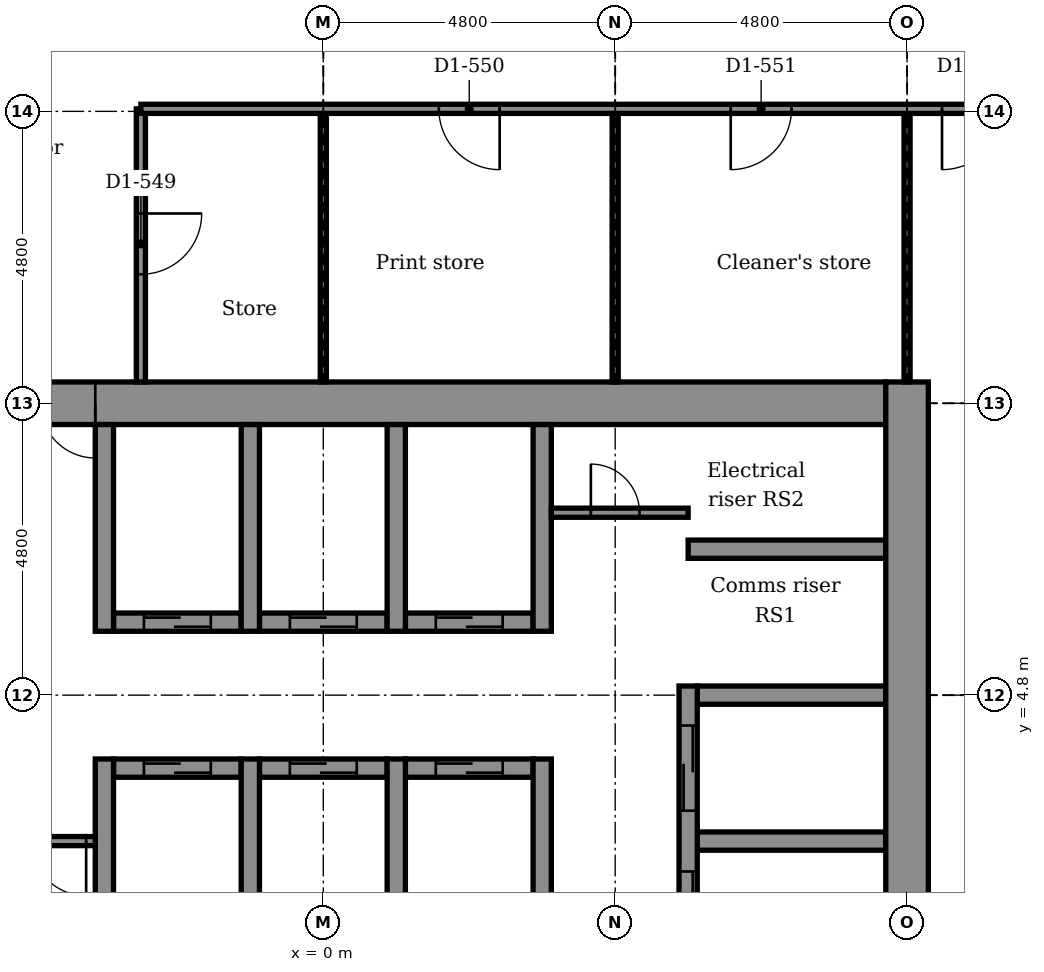
"""IFC4 building model, lengths in metres.
Left out: names, types, materials, properties, quantities, classifications, styles, units other than length and angle.
Written with IfcOpenShell. Run it as: python <this file> out.ifc"""

import sys

from ifc_helpers import new_model, si_unit, direction, frame, frame_2d, origin, place, context, subcontext, project, spatial, rectangle, extrude, element, fill, save


model = new_model("IFC4")
c1 = context("Model", 3, precision=1e-05, world=origin(), true_north=direction((0.0, 1.0)))
c2 = subcontext(c1, "Body", "Model", "MODEL_VIEW")
j1 = project(units=[si_unit("LENGTHUNIT", "METRE"), si_unit("PLANEANGLEUNIT", "RADIAN")], contexts=[c1])
p1 = place(None, origin())
s1 = spatial("IfcSite", under=j1, at=p1, CompositionType="ELEMENT")
p2 = place(p1, origin())
s2 = spatial("IfcBuilding", under=s1, at=p2, CompositionType="ELEMENT")
p3 = place(p2, frame((0.0, 0.0, 197.3)))
s3 = spatial("IfcBuildingStorey", under=s2, at=p3, CompositionType="ELEMENT", Elevation=197.3)
p4 = place(p3, frame((6.15, 2.4, -0.15), z_axis=(0.0, 0.0, 1.0), x_axis=(1.0, 0.0, 0.0)))
e1 = element("IfcWall", 1, at=p4, inside=s3, PredefinedType="STANDARD", context=c2, shape_type="SweptSolid", body=[
    extrude(rectangle(XDim=3.1, YDim=0.3, at=frame_2d((1.55, 0.0))), origin(), (0.0, 0.0, 1.0), 3.9),
])
p5 = place(p3, frame((-3.45, 3.6, -0.15), z_axis=(0.0, 0.0, 1.0), x_axis=(1.0, 0.0, 0.0)))
e2 = element("IfcWall", 2, at=p5, inside=s3, PredefinedType="STANDARD", context=c2, shape_type="SweptSolid", body=[
    extrude(rectangle(XDim=2.1, YDim=0.3, at=frame_2d((1.05, 0.0))), origin(), (0.0, 0.0, 1.0), 3.9),
])
p6 = place(p5, frame((0.5, 0.0, 0.15)))
e3 = element("IfcOpeningElement", 3, at=p6, cuts=e2, PredefinedType="OPENING", context=c2, shape_type="SweptSolid", body=[
    extrude(rectangle(XDim=1.1, YDim=2.1, at=frame_2d((0.55, 1.05))), frame((0.0, 0.16, 0.0), z_axis=(0.0, -1.0, 0.0), x_axis=(1.0, 0.0, 0.0)), (0.0, 0.0, 1.0), 0.32),
])
p7 = place(p3, frame((-1.05, 3.6, -0.15), z_axis=(0.0, 0.0, 1.0), x_axis=(1.0, 0.0, 0.0)))
e4 = element("IfcWall", 4, at=p7, inside=s3, PredefinedType="STANDARD", context=c2, shape_type="SweptSolid", body=[
    extrude(rectangle(XDim=2.1, YDim=0.3, at=frame_2d((1.05, 0.0))), origin(), (0.0, 0.0, 1.0), 3.9),
])
p8 = place(p7, frame((0.5, 0.0, 0.15)))
e5 = element("IfcOpeningElement", 5, at=p8, cuts=e4, PredefinedType="OPENING", context=c2, shape_type="SweptSolid", body=[
    extrude(rectangle(XDim=1.1, YDim=2.1, at=frame_2d((0.55, 1.05))), frame((0.0, 0.16, 0.0), z_axis=(0.0, -1.0, 0.0), x_axis=(1.0, 0.0, 0.0)), (0.0, 0.0, 1.0), 0.32),
])
p9 = place(p3, frame((1.35, 3.6, -0.15), z_axis=(0.0, 0.0, 1.0), x_axis=(1.0, 0.0, 0.0)))
e6 = element("IfcWall", 6, at=p9, inside=s3, PredefinedType="STANDARD", context=c2, shape_type="SweptSolid", body=[
    extrude(rectangle(XDim=2.1, YDim=0.3, at=frame_2d((1.05, 0.0))), origin(), (0.0, 0.0, 1.0), 3.9),
])
p10 = place(p9, frame((0.5, 0.0, 0.15)))
e7 = element("IfcOpeningElement", 7, at=p10, cuts=e6, PredefinedType="OPENING", context=c2, shape_type="SweptSolid", body=[
    extrude(rectangle(XDim=1.1, YDim=2.1, at=frame_2d((0.55, 1.05))), frame((0.0, 0.16, 0.0), z_axis=(0.0, -1.0, 0.0), x_axis=(1.0, 0.0, 0.0)), (0.0, 0.0, 1.0), 0.32),
])
p11 = place(p3, frame((6.15, 4.8, -0.15), z_axis=(0.0, 0.0, 1.0), x_axis=(1.0, 0.0, 0.0)))
e8 = element("IfcWall", 8, at=p11, inside=s3, PredefinedType="STANDARD", context=c2, shape_type="SweptSolid", body=[
    extrude(rectangle(XDim=3.1, YDim=0.3, at=frame_2d((1.55, 0.0))), origin(), (0.0, 0.0, 1.0), 3.9),
])
p12 = place(p3, frame((-3.45, 6.0, -0.15), z_axis=(0.0, 0.0, 1.0), x_axis=(1.0, 0.0, 0.0)))
e9 = element("IfcWall", 9, at=p12, inside=s3, PredefinedType="STANDARD", context=c2, shape_type="SweptSolid", body=[
    extrude(rectangle(XDim=2.1, YDim=0.3, at=frame_2d((1.05, 0.0))), origin(), (0.0, 0.0, 1.0), 3.9),
])
p13 = place(p12, frame((0.5, 0.0, 0.15)))
e10 = element("IfcOpeningElement", 10, at=p13, cuts=e9, PredefinedType="OPENING", context=c2, shape_type="SweptSolid", body=[
    extrude(rectangle(XDim=1.1, YDim=2.1, at=frame_2d((0.55, 1.05))), frame((0.0, 0.16, 0.0), z_axis=(0.0, -1.0, 0.0), x_axis=(1.0, 0.0, 0.0)), (0.0, 0.0, 1.0), 0.32),
])
p14 = place(p3, frame((-1.05, 6.0, -0.15), z_axis=(0.0, 0.0, 1.0), x_axis=(1.0, 0.0, 0.0)))
e11 = element("IfcWall", 11, at=p14, inside=s3, PredefinedType="STANDARD", context=c2, shape_type="SweptSolid", body=[
    extrude(rectangle(XDim=2.1, YDim=0.3, at=frame_2d((1.05, 0.0))), origin(), (0.0, 0.0, 1.0), 3.9),
])
p15 = place(p14, frame((0.5, 0.0, 0.15)))
e12 = element("IfcOpeningElement", 12, at=p15, cuts=e11, PredefinedType="OPENING", context=c2, shape_type="SweptSolid", body=[
    extrude(rectangle(XDim=1.1, YDim=2.1, at=frame_2d((0.55, 1.05))), frame((0.0, 0.16, 0.0), z_axis=(0.0, -1.0, 0.0), x_axis=(1.0, 0.0, 0.0)), (0.0, 0.0, 1.0), 0.32),
])
p16 = place(p3, frame((1.35, 6.0, -0.15), z_axis=(0.0, 0.0, 1.0), x_axis=(1.0, 0.0, 0.0)))
e13 = element("IfcWall", 13, at=p16, inside=s3, PredefinedType="STANDARD", context=c2, shape_type="SweptSolid", body=[
    extrude(rectangle(XDim=2.1, YDim=0.3, at=frame_2d((1.05, 0.0))), origin(), (0.0, 0.0, 1.0), 3.9),
])
p17 = place(p16, frame((0.5, 0.0, 0.15)))
e14 = element("IfcOpeningElement", 14, at=p17, cuts=e13, PredefinedType="OPENING", context=c2, shape_type="SweptSolid", body=[
    extrude(rectangle(XDim=1.1, YDim=2.1, at=frame_2d((0.55, 1.05))), frame((0.0, 0.16, 0.0), z_axis=(0.0, -1.0, 0.0), x_axis=(1.0, 0.0, 0.0)), (0.0, 0.0, 1.0), 0.32),
])
p18 = place(p3, frame((6.0, 7.2, -0.15), z_axis=(0.0, 0.0, 1.0), x_axis=(1.0, 0.0, 0.0)))
e15 = element("IfcWall", 15, at=p18, inside=s3, PredefinedType="STANDARD", context=c2, shape_type="SweptSolid", body=[
    extrude(rectangle(XDim=3.25, YDim=0.3, at=frame_2d((1.625, 0.0))), origin(), (0.0, 0.0, 1.0), 3.9),
])
p19 = place(p3, frame((-5.25, 9.6, -0.15), z_axis=(0.0, 0.0, 1.0), x_axis=(1.0, 0.0, 0.0)))
e16 = element("IfcWall", 16, at=p19, inside=s3, PredefinedType="SHEAR", context=c2, shape_type="SweptSolid", body=[
    extrude(rectangle(XDim=14.5, YDim=0.7, at=frame_2d((7.25, 0.0))), origin(), (0.0, 0.0, 1.0), 3.9),
])
p20 = place(p19, frame((0.6, 0.0, 0.15)))
e17 = element("IfcOpeningElement", 17, at=p20, cuts=e16, PredefinedType="OPENING", context=c2, shape_type="SweptSolid", body=[
    extrude(rectangle(XDim=0.9, YDim=2.1, at=frame_2d((0.45, 1.05))), frame((0.0, 0.36, 0.0), z_axis=(0.0, -1.0, 0.0), x_axis=(1.0, 0.0, 0.0)), (0.0, 0.0, 1.0), 0.72),
])
p21 = place(p3, frame((-3.6, -3.75, -0.15), z_axis=(0.0, 0.0, 1.0), x_axis=(0.0, 1.0, 0.0)))
e18 = element("IfcWall", 18, at=p21, inside=s3, PredefinedType="STANDARD", context=c2, shape_type="SweptSolid", body=[
    extrude(rectangle(XDim=7.5, YDim=0.3, at=frame_2d((3.75, 0.0))), origin(), (0.0, 0.0, 1.0), 3.9),
])
p22 = place(p3, frame((-3.6, 5.85, -0.15), z_axis=(0.0, 0.0, 1.0), x_axis=(0.0, 1.0, 0.0)))
e19 = element("IfcWall", 19, at=p22, inside=s3, PredefinedType="STANDARD", context=c2, shape_type="SweptSolid", body=[
    extrude(rectangle(XDim=3.4, YDim=0.3, at=frame_2d((1.7, 0.0))), origin(), (0.0, 0.0, 1.0), 3.9),
])
p23 = place(p3, frame((-1.2, -3.75, -0.15), z_axis=(0.0, 0.0, 1.0), x_axis=(0.0, 1.0, 0.0)))
e20 = element("IfcWall", 20, at=p23, inside=s3, PredefinedType="STANDARD", context=c2, shape_type="SweptSolid", body=[
    extrude(rectangle(XDim=7.5, YDim=0.3, at=frame_2d((3.75, 0.0))), origin(), (0.0, 0.0, 1.0), 3.9),
])
p24 = place(p3, frame((-1.2, 5.85, -0.15), z_axis=(0.0, 0.0, 1.0), x_axis=(0.0, 1.0, 0.0)))
e21 = element("IfcWall", 21, at=p24, inside=s3, PredefinedType="STANDARD", context=c2, shape_type="SweptSolid", body=[
    extrude(rectangle(XDim=3.4, YDim=0.3, at=frame_2d((1.7, 0.0))), origin(), (0.0, 0.0, 1.0), 3.9),
])
p25 = place(p3, frame((1.2, -3.75, -0.15), z_axis=(0.0, 0.0, 1.0), x_axis=(0.0, 1.0, 0.0)))
e22 = element("IfcWall", 22, at=p25, inside=s3, PredefinedType="STANDARD", context=c2, shape_type="SweptSolid", body=[
    extrude(rectangle(XDim=7.5, YDim=0.3, at=frame_2d((3.75, 0.0))), origin(), (0.0, 0.0, 1.0), 3.9),
])
p26 = place(p3, frame((1.2, 5.85, -0.15), z_axis=(0.0, 0.0, 1.0), x_axis=(0.0, 1.0, 0.0)))
e23 = element("IfcWall", 23, at=p26, inside=s3, PredefinedType="STANDARD", context=c2, shape_type="SweptSolid", body=[
    extrude(rectangle(XDim=3.4, YDim=0.3, at=frame_2d((1.7, 0.0))), origin(), (0.0, 0.0, 1.0), 3.9),
])
p27 = place(p3, frame((3.6, -3.75, -0.15), z_axis=(0.0, 0.0, 1.0), x_axis=(0.0, 1.0, 0.0)))
e24 = element("IfcWall", 24, at=p27, inside=s3, PredefinedType="STANDARD", context=c2, shape_type="SweptSolid", body=[
    extrude(rectangle(XDim=7.5, YDim=0.3, at=frame_2d((3.75, 0.0))), origin(), (0.0, 0.0, 1.0), 3.9),
])
p28 = place(p3, frame((3.6, 5.85, -0.15), z_axis=(0.0, 0.0, 1.0), x_axis=(0.0, 1.0, 0.0)))
e25 = element("IfcWall", 25, at=p28, inside=s3, PredefinedType="STANDARD", context=c2, shape_type="SweptSolid", body=[
    extrude(rectangle(XDim=3.4, YDim=0.3, at=frame_2d((1.7, 0.0))), origin(), (0.0, 0.0, 1.0), 3.9),
])
p29 = place(p3, frame((6.0, -2.55, -0.15), z_axis=(0.0, 0.0, 1.0), x_axis=(0.0, 1.0, 0.0)))
e26 = element("IfcWall", 26, at=p29, inside=s3, PredefinedType="STANDARD", context=c2, shape_type="SweptSolid", body=[
    extrude(rectangle(XDim=7.5, YDim=0.3, at=frame_2d((3.75, 0.0))), origin(), (0.0, 0.0, 1.0), 3.9),
])
p30 = place(p29, frame((0.65, 0.0, 0.15)))
e27 = element("IfcOpeningElement", 27, at=p30, cuts=e26, PredefinedType="OPENING", context=c2, shape_type="SweptSolid", body=[
    extrude(rectangle(XDim=1.4, YDim=2.1, at=frame_2d((0.7, 1.05))), frame((0.0, 0.16, 0.0), z_axis=(0.0, -1.0, 0.0), x_axis=(1.0, 0.0, 0.0)), (0.0, 0.0, 1.0), 0.32),
])
p31 = place(p29, frame((3.05, 0.0, 0.15)))
e28 = element("IfcOpeningElement", 28, at=p31, cuts=e26, PredefinedType="OPENING", context=c2, shape_type="SweptSolid", body=[
    extrude(rectangle(XDim=1.4, YDim=2.1, at=frame_2d((0.7, 1.05))), frame((0.0, 0.16, 0.0), z_axis=(0.0, -1.0, 0.0), x_axis=(1.0, 0.0, 0.0)), (0.0, 0.0, 1.0), 0.32),
])
p32 = place(p29, frame((5.45, 0.0, 0.15)))
e29 = element("IfcOpeningElement", 29, at=p32, cuts=e26, PredefinedType="OPENING", context=c2, shape_type="SweptSolid", body=[
    extrude(rectangle(XDim=1.4, YDim=2.1, at=frame_2d((0.7, 1.05))), frame((0.0, 0.16, 0.0), z_axis=(0.0, -1.0, 0.0), x_axis=(1.0, 0.0, 0.0)), (0.0, 0.0, 1.0), 0.32),
])
p33 = place(p3, frame((9.6, -10.15, -0.15), z_axis=(0.0, 0.0, 1.0), x_axis=(0.0, 1.0, 0.0)))
e30 = element("IfcWall", 30, at=p33, inside=s3, PredefinedType="SHEAR", context=c2, shape_type="SweptSolid", body=[
    extrude(rectangle(XDim=20.1, YDim=0.7, at=frame_2d((10.05, 0.0))), origin(), (0.0, 0.0, 1.0), 3.9),
])
for number, where, z_axis, x_axis in (
    (31, (9.6, 9.95, 0.0), (0.0, 0.0, 1.0), (0.0, 1.0, 0.0)),
    (32, (4.8, 9.95, 0.0), (0.0, 0.0, 1.0), (0.0, 1.0, 0.0)),
    (33, (0.0, 9.95, 0.0), (0.0, 0.0, 1.0), (0.0, 1.0, 0.0)),
):
    element("IfcWall", number, at=place(p3, frame(where, z_axis=z_axis, x_axis=x_axis)), inside=s3, PredefinedType="PARTITIONING", context=c2, shape_type="SweptSolid", body=[
        extrude(rectangle(XDim=4.491, YDim=0.1, at=frame_2d((2.246, 0.0))), origin(), (0.0, 0.0, 1.0), 3.066),
    ])
p34 = place(p3, frame((-3.0, 9.95, 0.0), z_axis=(0.0, 0.0, 1.0), x_axis=(0.0, 1.0, 0.0)))
e34 = element("IfcWall", 34, at=p34, inside=s3, PredefinedType="PARTITIONING", context=c2, shape_type="SweptSolid", body=[
    extrude(rectangle(XDim=4.491, YDim=0.15, at=frame_2d((2.246, 0.0))), origin(), (0.0, 0.0, 1.0), 3.75),
])
p35 = place(p34, frame((1.771, 0.0, 0.0)))
e35 = element("IfcOpeningElement", 35, at=p35, cuts=e34, PredefinedType="OPENING", context=c2, shape_type="SweptSolid", body=[
    extrude(rectangle(XDim=1.0, YDim=2.1, at=frame_2d((0.5, 1.05))), frame((0.0, 0.085, 0.0), z_axis=(0.0, -1.0, 0.0), x_axis=(1.0, 0.0, 0.0)), (0.0, 0.0, 1.0), 0.17),
])
p36 = place(p3, frame((3.75, 7.8, 0.0), z_axis=(0.0, 0.0, 1.0), x_axis=(1.0, 0.0, 0.0)))
e36 = element("IfcWall", 36, at=p36, inside=s3, PredefinedType="PARTITIONING", context=c2, shape_type="SweptSolid", body=[
    extrude(rectangle(XDim=2.25, YDim=0.15, at=frame_2d((1.125, 0.0))), origin(), (0.0, 0.0, 1.0), 3.75),
])
p37 = place(p36, frame((0.65, 0.0, 0.0)))
e37 = element("IfcOpeningElement", 37, at=p37, cuts=e36, PredefinedType="OPENING", context=c2, shape_type="SweptSolid", body=[
    extrude(rectangle(XDim=0.8, YDim=2.1, at=frame_2d((0.4, 1.05))), frame((0.0, 0.085, 0.0), z_axis=(0.0, -1.0, 0.0), x_axis=(1.0, 0.0, 0.0)), (0.0, 0.0, 1.0), 0.17),
])
p38 = place(p3, frame((-3.0, 14.441, 0.0), z_axis=(0.0, 0.0, 1.0), x_axis=(1.0, 0.0, 0.0)))
e38 = element("IfcWall", 38, at=p38, inside=s3, PredefinedType="PARTITIONING", context=c2, shape_type="SweptSolid", body=[
    extrude(rectangle(XDim=19.843, YDim=0.15, at=frame_2d((9.921, 0.0))), origin(), (0.0, 0.0, 1.0), 3.75),
])
p39 = place(p38, frame((4.9, 0.0, 0.0)))
e39 = element("IfcOpeningElement", 39, at=p39, cuts=e38, PredefinedType="OPENING", context=c2, shape_type="SweptSolid", body=[
    extrude(rectangle(XDim=1.0, YDim=2.1, at=frame_2d((0.5, 1.05))), frame((0.0, 0.085, 0.0), z_axis=(0.0, -1.0, 0.0), x_axis=(1.0, 0.0, 0.0)), (0.0, 0.0, 1.0), 0.17),
])
p40 = place(p38, frame((9.7, 0.0, 0.0)))
e40 = element("IfcOpeningElement", 40, at=p40, cuts=e38, PredefinedType="OPENING", context=c2, shape_type="SweptSolid", body=[
    extrude(rectangle(XDim=1.0, YDim=2.1, at=frame_2d((0.5, 1.05))), frame((0.0, 0.085, 0.0), z_axis=(0.0, -1.0, 0.0), x_axis=(1.0, 0.0, 0.0)), (0.0, 0.0, 1.0), 0.17),
])
p41 = place(p38, frame((13.175, 0.0, 0.0)))
e41 = element("IfcOpeningElement", 41, at=p41, cuts=e38, PredefinedType="OPENING", context=c2, shape_type="SweptSolid", body=[
    extrude(rectangle(XDim=1.0, YDim=2.1, at=frame_2d((0.5, 1.05))), frame((0.0, 0.085, 0.0), z_axis=(0.0, -1.0, 0.0), x_axis=(1.0, 0.0, 0.0)), (0.0, 0.0, 1.0), 0.17),
])
p42 = place(p38, frame((15.771, 0.0, 0.0)))
e42 = element("IfcOpeningElement", 42, at=p42, cuts=e38, PredefinedType="OPENING", context=c2, shape_type="SweptSolid", body=[
    extrude(rectangle(XDim=1.8, YDim=2.1, at=frame_2d((0.9, 1.05))), frame((0.0, 0.085, 0.0), z_axis=(0.0, -1.0, 0.0), x_axis=(1.0, 0.0, 0.0)), (0.0, 0.0, 1.0), 0.17),
])
p43 = place(p3, frame((-4.95, 2.4, 0.0), z_axis=(0.0, 0.0, 1.0), x_axis=(1.0, 0.0, 0.0)))
e43 = element("IfcWall", 43, at=p43, inside=s3, PredefinedType="PARTITIONING", context=c2, shape_type="SweptSolid", body=[
    extrude(rectangle(XDim=1.2, YDim=0.15, at=frame_2d((0.6, 0.0))), origin(), (0.0, 0.0, 1.0), 3.75),
])
p44 = place(p43, frame((0.15, 0.0, 0.0)))
e44 = element("IfcOpeningElement", 44, at=p44, cuts=e43, PredefinedType="OPENING", context=c2, shape_type="SweptSolid", body=[
    extrude(rectangle(XDim=0.9, YDim=2.1, at=frame_2d((0.45, 1.05))), frame((0.0, 0.085, 0.0), z_axis=(0.0, -1.0, 0.0), x_axis=(1.0, 0.0, 0.0)), (0.0, 0.0, 1.0), 0.17),
])
p45 = place(p37, origin())
e45 = element("IfcDoor", 45, at=p45, inside=s3, OperationType="SINGLE_SWING_LEFT", PredefinedType="DOOR", context=c2, shape_type="SweptSolid", body=[
    extrude(rectangle(XDim=0.8, YDim=2.1, at=frame_2d((0.4, 1.05))), frame((0.0, 0.025, 0.0), z_axis=(0.0, -1.0, 0.0), x_axis=(1.0, 0.0, 0.0)), (0.0, 0.0, 1.0), 0.05),
])
fill(e37, e45)
p46 = place(p35, frame((1.0, 0.0, 0.0), z_axis=(0.0, 0.0, 1.0), x_axis=(-1.0, 0.0, 0.0)))
e46 = element("IfcDoor", 46, at=p46, inside=s3, OperationType="SINGLE_SWING_RIGHT", PredefinedType="DOOR", context=c2, shape_type="SweptSolid", body=[
    extrude(rectangle(XDim=1.0, YDim=2.1, at=frame_2d((0.5, 1.05))), frame((0.0, 0.025, 0.0), z_axis=(0.0, -1.0, 0.0), x_axis=(1.0, 0.0, 0.0)), (0.0, 0.0, 1.0), 0.05),
])
fill(e35, e46)
p47 = place(p39, frame((1.0, 0.0, 0.0), z_axis=(0.0, 0.0, 1.0), x_axis=(-1.0, 0.0, 0.0)))
e47 = element("IfcDoor", 47, at=p47, inside=s3, OperationType="SINGLE_SWING_RIGHT", PredefinedType="DOOR", context=c2, shape_type="SweptSolid", body=[
    extrude(rectangle(XDim=1.0, YDim=2.1, at=frame_2d((0.5, 1.05))), frame((0.0, 0.025, 0.0), z_axis=(0.0, -1.0, 0.0), x_axis=(1.0, 0.0, 0.0)), (0.0, 0.0, 1.0), 0.05),
])
fill(e39, e47)
p48 = place(p40, frame((1.0, 0.0, 0.0), z_axis=(0.0, 0.0, 1.0), x_axis=(-1.0, 0.0, 0.0)))
e48 = element("IfcDoor", 48, at=p48, inside=s3, OperationType="SINGLE_SWING_LEFT", PredefinedType="DOOR", context=c2, shape_type="SweptSolid", body=[
    extrude(rectangle(XDim=1.0, YDim=2.1, at=frame_2d((0.5, 1.05))), frame((0.0, 0.025, 0.0), z_axis=(0.0, -1.0, 0.0), x_axis=(1.0, 0.0, 0.0)), (0.0, 0.0, 1.0), 0.05),
])
fill(e40, e48)
p49 = place(p41, frame((1.0, 0.0, 0.0), z_axis=(0.0, 0.0, 1.0), x_axis=(-1.0, 0.0, 0.0)))
e49 = element("IfcDoor", 49, at=p49, inside=s3, OperationType="SINGLE_SWING_LEFT", PredefinedType="DOOR", context=c2, shape_type="SweptSolid", body=[
    extrude(rectangle(XDim=1.0, YDim=2.1, at=frame_2d((0.5, 1.05))), frame((0.0, 0.025, 0.0), z_axis=(0.0, -1.0, 0.0), x_axis=(1.0, 0.0, 0.0)), (0.0, 0.0, 1.0), 0.05),
])
fill(e41, e49)
p50 = place(p31, origin())
e50 = element("IfcDoor", 50, at=p50, inside=s3, OperationType="DOUBLE_DOOR_SLIDING", PredefinedType="DOOR", context=c2, shape_type="SweptSolid", body=[
    extrude(rectangle(XDim=1.4, YDim=2.1, at=frame_2d((0.7, 1.05))), frame((0.0, 0.025, 0.0), z_axis=(0.0, -1.0, 0.0), x_axis=(1.0, 0.0, 0.0)), (0.0, 0.0, 1.0), 0.05),
])
fill(e28, e50)
p51 = place(p32, origin())
e51 = element("IfcDoor", 51, at=p51, inside=s3, OperationType="DOUBLE_DOOR_SLIDING", PredefinedType="DOOR", context=c2, shape_type="SweptSolid", body=[
    extrude(rectangle(XDim=1.4, YDim=2.1, at=frame_2d((0.7, 1.05))), frame((0.0, 0.025, 0.0), z_axis=(0.0, -1.0, 0.0), x_axis=(1.0, 0.0, 0.0)), (0.0, 0.0, 1.0), 0.05),
])
fill(e29, e51)
p52 = place(p13, origin())
e52 = element("IfcDoor", 52, at=p52, inside=s3, OperationType="DOUBLE_DOOR_SLIDING", PredefinedType="DOOR", context=c2, shape_type="SweptSolid", body=[
    extrude(rectangle(XDim=1.1, YDim=2.1, at=frame_2d((0.55, 1.05))), frame((0.0, 0.025, 0.0), z_axis=(0.0, -1.0, 0.0), x_axis=(1.0, 0.0, 0.0)), (0.0, 0.0, 1.0), 0.05),
])
fill(e10, e52)
p53 = place(p15, origin())
e53 = element("IfcDoor", 53, at=p53, inside=s3, OperationType="DOUBLE_DOOR_SLIDING", PredefinedType="DOOR", context=c2, shape_type="SweptSolid", body=[
    extrude(rectangle(XDim=1.1, YDim=2.1, at=frame_2d((0.55, 1.05))), frame((0.0, 0.025, 0.0), z_axis=(0.0, -1.0, 0.0), x_axis=(1.0, 0.0, 0.0)), (0.0, 0.0, 1.0), 0.05),
])
fill(e12, e53)
p54 = place(p17, origin())
e54 = element("IfcDoor", 54, at=p54, inside=s3, OperationType="DOUBLE_DOOR_SLIDING", PredefinedType="DOOR", context=c2, shape_type="SweptSolid", body=[
    extrude(rectangle(XDim=1.1, YDim=2.1, at=frame_2d((0.55, 1.05))), frame((0.0, 0.025, 0.0), z_axis=(0.0, -1.0, 0.0), x_axis=(1.0, 0.0, 0.0)), (0.0, 0.0, 1.0), 0.05),
])
fill(e14, e54)
p55 = place(p6, origin())
e55 = element("IfcDoor", 55, at=p55, inside=s3, OperationType="DOUBLE_DOOR_SLIDING", PredefinedType="DOOR", context=c2, shape_type="SweptSolid", body=[
    extrude(rectangle(XDim=1.1, YDim=2.1, at=frame_2d((0.55, 1.05))), frame((0.0, 0.025, 0.0), z_axis=(0.0, -1.0, 0.0), x_axis=(1.0, 0.0, 0.0)), (0.0, 0.0, 1.0), 0.05),
])
fill(e3, e55)
p56 = place(p8, origin())
e56 = element("IfcDoor", 56, at=p56, inside=s3, OperationType="DOUBLE_DOOR_SLIDING", PredefinedType="DOOR", context=c2, shape_type="SweptSolid", body=[
    extrude(rectangle(XDim=1.1, YDim=2.1, at=frame_2d((0.55, 1.05))), frame((0.0, 0.025, 0.0), z_axis=(0.0, -1.0, 0.0), x_axis=(1.0, 0.0, 0.0)), (0.0, 0.0, 1.0), 0.05),
])
fill(e5, e56)
p57 = place(p10, origin())
e57 = element("IfcDoor", 57, at=p57, inside=s3, OperationType="DOUBLE_DOOR_SLIDING", PredefinedType="DOOR", context=c2, shape_type="SweptSolid", body=[
    extrude(rectangle(XDim=1.1, YDim=2.1, at=frame_2d((0.55, 1.05))), frame((0.0, 0.025, 0.0), z_axis=(0.0, -1.0, 0.0), x_axis=(1.0, 0.0, 0.0)), (0.0, 0.0, 1.0), 0.05),
])
fill(e7, e57)
p58 = place(p20, frame((0.9, 0.0, 0.0), z_axis=(0.0, 0.0, 1.0), x_axis=(-1.0, 0.0, 0.0)))
e58 = element("IfcDoor", 58, at=p58, inside=s3, OperationType="SINGLE_SWING_RIGHT", PredefinedType="DOOR", context=c2, shape_type="SweptSolid", body=[
    extrude(rectangle(XDim=0.9, YDim=2.1, at=frame_2d((0.45, 1.05))), frame((0.0, 0.025, 0.0), z_axis=(0.0, -1.0, 0.0), x_axis=(1.0, 0.0, 0.0)), (0.0, 0.0, 1.0), 0.05),
])
fill(e17, e58)
p59 = place(p44, frame((0.9, 0.0, 0.0), z_axis=(0.0, 0.0, 1.0), x_axis=(-1.0, 0.0, 0.0)))
e59 = element("IfcDoor", 59, at=p59, inside=s3, OperationType="SINGLE_SWING_RIGHT", PredefinedType="DOOR", context=c2, shape_type="SweptSolid", body=[
    extrude(rectangle(XDim=0.9, YDim=2.1, at=frame_2d((0.45, 1.05))), frame((0.0, 0.025, 0.0), z_axis=(0.0, -1.0, 0.0), x_axis=(1.0, 0.0, 0.0)), (0.0, 0.0, 1.0), 0.05),
])
fill(e44, e59)
save(model, sys.argv[1])
